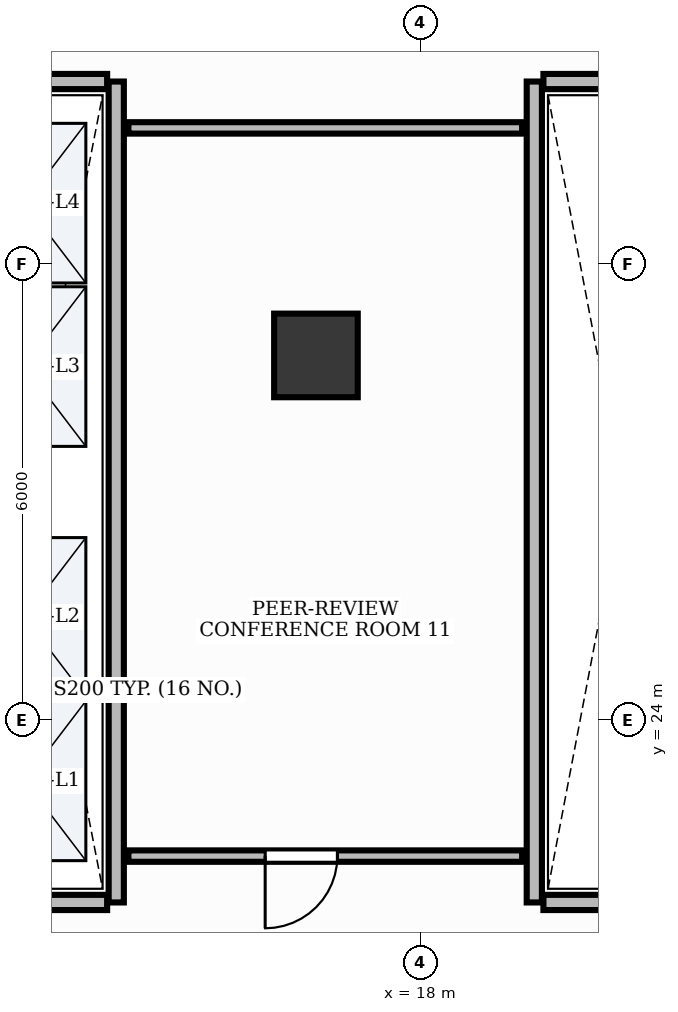
"""IFC4 building model, lengths in metres.
Left out: names, types, materials, properties, quantities, classifications, styles, units other than length and angle.
Written with IfcOpenShell. Run it as: python <this file> out.ifc"""

import sys

from ifc_helpers import new_model, si_unit, direction, frame, frame_2d, origin, origin_2d, place, context, subcontext, project, spatial, rectangle, extrude, element, fill, save


model = new_model("IFC4")
c1 = context("Model", 3, precision=1e-05, world=origin(), true_north=direction((0.0, 1.0)))
c2 = subcontext(c1, "Body", "Model", "MODEL_VIEW")
j1 = project(units=[si_unit("LENGTHUNIT", "METRE"), si_unit("PLANEANGLEUNIT", "RADIAN")], contexts=[c1])
p1 = place(None, origin())
s1 = spatial("IfcSite", under=j1, at=p1, CompositionType="ELEMENT")
p2 = place(p1, origin())
s2 = spatial("IfcBuilding", under=s1, at=p2, CompositionType="ELEMENT")
p3 = place(p2, frame((0.0, 0.0, 106.8)))
s3 = spatial("IfcBuildingStorey", under=s2, at=p3, CompositionType="ELEMENT", Elevation=106.8)
p4 = place(p3, frame((16.627, 28.797, -0.0), z_axis=(0.0, 0.0, 1.0), x_axis=(1.0, 0.0, 0.0)))
e1 = element("IfcColumn", 1, at=p4, inside=s3, PredefinedType="COLUMN", context=c2, shape_type="SweptSolid", body=[
    extrude(rectangle(XDim=1.1, YDim=1.1, at=origin_2d()), origin(), (0.0, 0.0, 1.0), 3.901),
])
p5 = place(p3, frame((14.0, 21.6, 0.0), z_axis=(0.0, 0.0, 1.0), x_axis=(0.0, 1.0, 0.0)))
e2 = element("IfcWall", 2, at=p5, inside=s3, PredefinedType="PARTITIONING", context=c2, shape_type="SweptSolid", body=[
    extrude(rectangle(XDim=10.8, YDim=0.2, at=frame_2d((5.4, 0.0))), origin(), (0.0, 0.0, 1.0), 2.91),
])
for number, where, z_axis, x_axis in (
    (3, (11.72, 21.6, 0.0), (0.0, 0.0, 1.0), (1.0, 0.0, 0.0)),
    (4, (11.72, 32.4, 0.0), (0.0, 0.0, 1.0), (1.0, 0.0, 0.0)),
):
    element("IfcWall", number, at=place(p3, frame(where, z_axis=z_axis, x_axis=x_axis)), inside=s3, PredefinedType="PARTITIONING", context=c2, shape_type="SweptSolid", body=[
        extrude(rectangle(XDim=2.16, YDim=0.2, at=frame_2d((1.08, 0.0))), origin(), (0.0, 0.0, 1.0), 2.91),
    ])
p6 = place(p3, frame((19.5, 21.6, 0.0), z_axis=(0.0, 0.0, 1.0), x_axis=(0.0, 1.0, 0.0)))
e5 = element("IfcWall", 5, at=p6, inside=s3, PredefinedType="PARTITIONING", context=c2, shape_type="SweptSolid", body=[
    extrude(rectangle(XDim=10.8, YDim=0.2, at=frame_2d((5.4, 0.0))), origin(), (0.0, 0.0, 1.0), 2.91),
])
for number, where, z_axis, x_axis in (
    (6, (19.62, 21.6, 0.0), (0.0, 0.0, 1.0), (1.0, 0.0, 0.0)),
    (7, (19.62, 32.4, 0.0), (0.0, 0.0, 1.0), (1.0, 0.0, 0.0)),
):
    element("IfcWall", number, at=place(p3, frame(where, z_axis=z_axis, x_axis=x_axis)), inside=s3, PredefinedType="PARTITIONING", context=c2, shape_type="SweptSolid", body=[
        extrude(rectangle(XDim=2.11, YDim=0.2, at=frame_2d((1.055, 0.0))), origin(), (0.0, 0.0, 1.0), 2.91),
    ])
p7 = place(p3, frame((19.34, 22.21, 0.0), z_axis=(0.0, 0.0, 1.0), x_axis=(-1.0, 0.0, 0.0)))
e8 = element("IfcWall", 8, at=p7, inside=s3, PredefinedType="PARTITIONING", context=c2, shape_type="SweptSolid", body=[
    extrude(rectangle(XDim=5.18, YDim=0.15, at=frame_2d((2.59, 0.0))), origin(), (0.0, 0.0, 1.0), 2.91),
])
p8 = place(p7, frame((2.431, 0.0, 0.0)))
e9 = element("IfcOpeningElement", 9, at=p8, cuts=e8, PredefinedType="OPENING", context=c2, shape_type="SweptSolid", body=[
    extrude(rectangle(XDim=0.95, YDim=2.15, at=frame_2d((0.475, 1.075))), frame((0.0, 0.09, 0.0), z_axis=(0.0, -1.0, 0.0), x_axis=(1.0, 0.0, 0.0)), (0.0, 0.0, 1.0), 0.18),
])
p9 = place(p3, frame((14.16, 31.79, 0.0), z_axis=(0.0, 0.0, 1.0), x_axis=(1.0, 0.0, 0.0)))
e10 = element("IfcWall", 10, at=p9, inside=s3, PredefinedType="PARTITIONING", context=c2, shape_type="SweptSolid", body=[
    extrude(rectangle(XDim=5.18, YDim=0.15, at=frame_2d((2.59, 0.0))), origin(), (0.0, 0.0, 1.0), 2.91),
])
p10 = place(p8, origin())
e11 = element("IfcDoor", 11, at=p10, inside=s3, OperationType="SINGLE_SWING_RIGHT", PredefinedType="DOOR", context=c2, shape_type="SweptSolid", body=[
    extrude(rectangle(XDim=0.95, YDim=2.15, at=frame_2d((0.475, 1.075))), frame((0.0, 0.025, 0.0), z_axis=(0.0, -1.0, 0.0), x_axis=(1.0, 0.0, 0.0)), (0.0, 0.0, 1.0), 0.05),
])
fill(e9, e11)
save(model, sys.argv[1])
